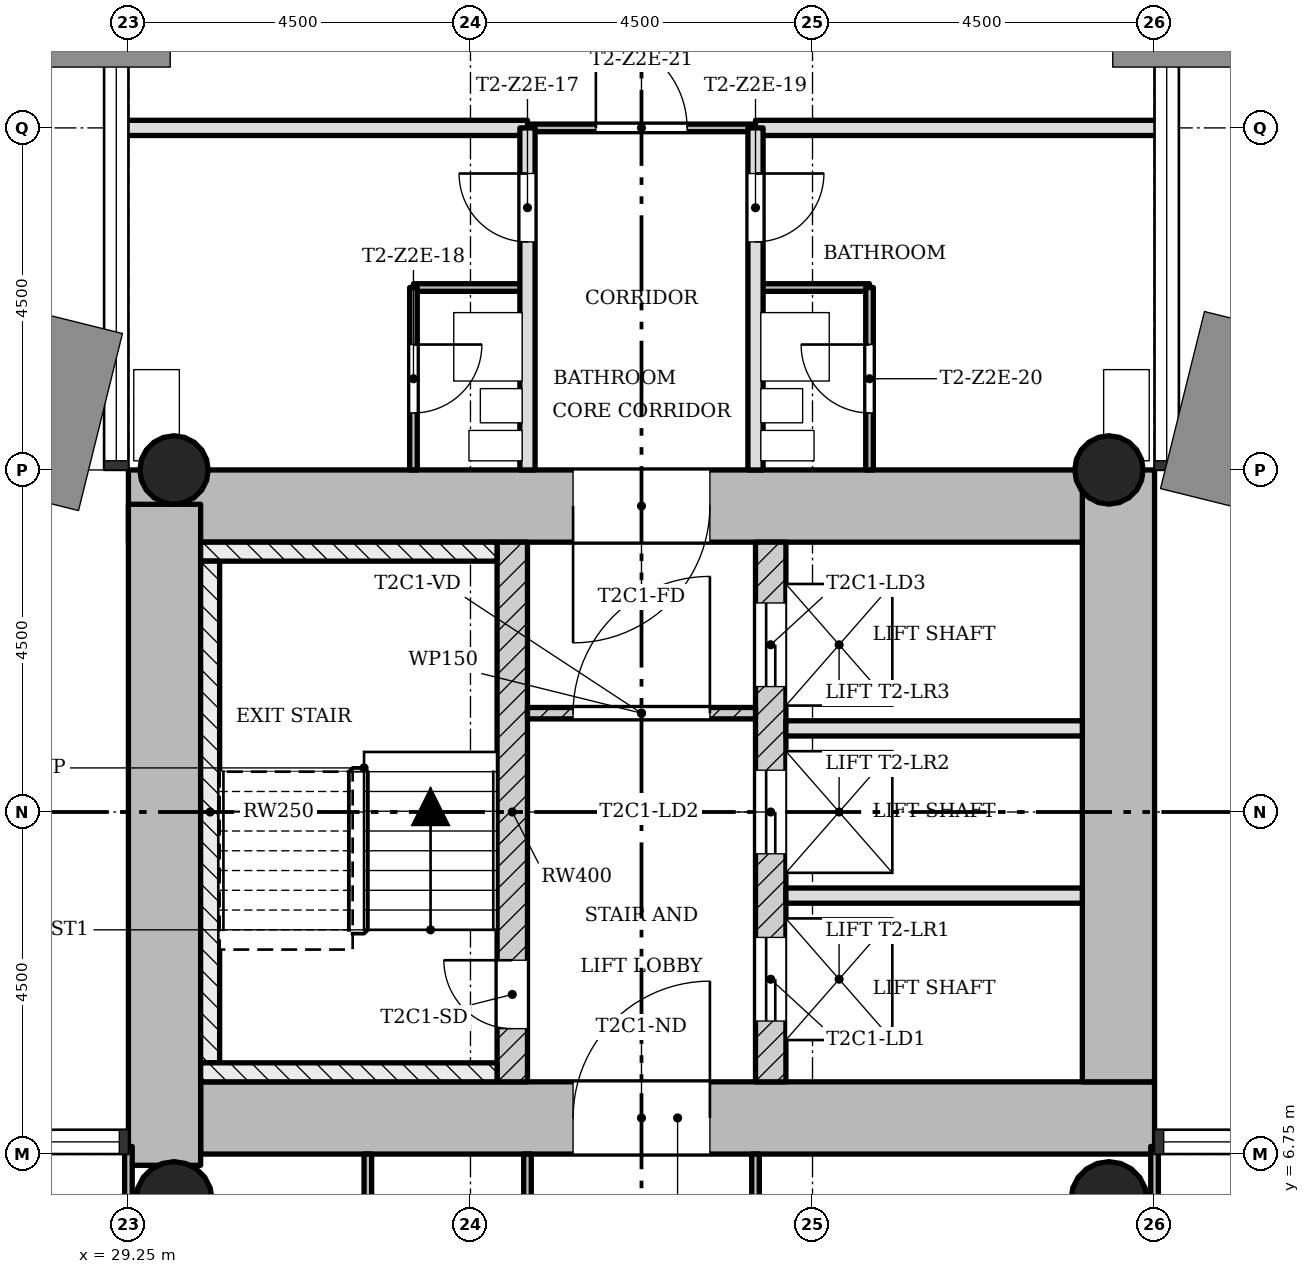
"""IFC4 building model, lengths in metres.
Left out: names, types, materials, properties, quantities, classifications, styles, units other than length and angle.
Written with IfcOpenShell. Run it as: python <this file> out.ifc"""

import sys

from ifc_helpers import new_model, si_unit, direction, frame, frame_2d, origin, origin_2d, place, context, subcontext, project, spatial, rectangle, hollow_circle, extrude, element, fill, save


model = new_model("IFC4")
c1 = context("Model", 3, precision=1e-05, world=origin(), true_north=direction((0.0, 1.0)))
c2 = subcontext(c1, "Body", "Model", "MODEL_VIEW")
j1 = project(units=[si_unit("LENGTHUNIT", "METRE"), si_unit("PLANEANGLEUNIT", "RADIAN")], contexts=[c1])
p1 = place(None, origin())
s1 = spatial("IfcSite", under=j1, at=p1, CompositionType="ELEMENT")
p2 = place(p1, origin())
s2 = spatial("IfcBuilding", under=s1, at=p2, CompositionType="ELEMENT")
p3 = place(p2, frame((0.0, 0.0, 100.4)))
s3 = spatial("IfcBuildingStorey", under=s2, at=p3, CompositionType="ELEMENT", Elevation=100.4)
p4 = place(p3, frame((30.2, 7.225, 0.0), z_axis=(0.0, 0.0, 1.0), x_axis=(1.0, 0.0, 0.0)))
e1 = element("IfcWall", 1, at=p4, inside=s3, PredefinedType="SHEAR", context=c2, shape_type="SweptSolid", body=[
    extrude(rectangle(XDim=12.55, YDim=0.95, at=frame_2d((6.275, 0.0))), origin(), (0.0, 0.0, 1.0), 3.4),
])
p5 = place(p4, frame((4.9, 0.0, 0.0)))
e2 = element("IfcOpeningElement", 2, at=p5, cuts=e1, PredefinedType="OPENING", context=c2, shape_type="SweptSolid", body=[
    extrude(rectangle(XDim=1.8, YDim=2.1, at=frame_2d((0.9, 1.05))), frame((0.0, 0.485, 0.0), z_axis=(0.0, -1.0, 0.0), x_axis=(1.0, 0.0, 0.0)), (0.0, 0.0, 1.0), 0.97),
])
p6 = place(p3, frame((42.275, 7.7, 0.0), z_axis=(0.0, 0.0, 1.0), x_axis=(0.0, 1.0, 0.0)))
e3 = element("IfcWall", 3, at=p6, inside=s3, PredefinedType="SHEAR", context=c2, shape_type="SweptSolid", body=[
    extrude(rectangle(XDim=8.05, YDim=0.95, at=frame_2d((4.025, 0.0))), origin(), (0.0, 0.0, 1.0), 3.4),
])
p7 = place(p3, frame((41.8, 15.275, 0.0), z_axis=(0.0, 0.0, 1.0), x_axis=(-1.0, 0.0, 0.0)))
e4 = element("IfcWall", 4, at=p7, inside=s3, PredefinedType="SHEAR", context=c2, shape_type="SweptSolid", body=[
    extrude(rectangle(XDim=12.55, YDim=0.95, at=frame_2d((6.275, 0.0))), origin(), (0.0, 0.0, 1.0), 3.4),
])
p8 = place(p7, frame((4.9, 0.0, 0.0)))
e5 = element("IfcOpeningElement", 5, at=p8, cuts=e4, PredefinedType="OPENING", context=c2, shape_type="SweptSolid", body=[
    extrude(rectangle(XDim=1.8, YDim=2.1, at=frame_2d((0.9, 1.05))), frame((0.0, 0.485, 0.0), z_axis=(0.0, -1.0, 0.0), x_axis=(1.0, 0.0, 0.0)), (0.0, 0.0, 1.0), 0.97),
])
p9 = place(p3, frame((29.725, 15.298, 0.0), z_axis=(0.0, 0.0, 1.0), x_axis=(0.0, -1.0, 0.0)))
e6 = element("IfcWall", 6, at=p9, inside=s3, PredefinedType="SHEAR", context=c2, shape_type="SweptSolid", body=[
    extrude(rectangle(XDim=8.696, YDim=0.95, at=frame_2d((4.348, 0.0))), origin(), (0.0, 0.0, 1.0), 3.4),
])
p10 = place(p3, frame((34.3, 7.7, 0.0), z_axis=(0.0, 0.0, 1.0), x_axis=(0.0, 1.0, 0.0)))
e7 = element("IfcWall", 7, at=p10, inside=s3, PredefinedType="SHEAR", context=c2, shape_type="SweptSolid", body=[
    extrude(rectangle(XDim=7.1, YDim=0.4, at=frame_2d((3.55, 0.0))), origin(), (0.0, 0.0, 1.0), 3.4),
])
p11 = place(p10, frame((0.7, 0.0, 0.0)))
e8 = element("IfcOpeningElement", 8, at=p11, cuts=e7, PredefinedType="OPENING", context=c2, shape_type="SweptSolid", body=[
    extrude(rectangle(XDim=0.9, YDim=2.1, at=frame_2d((0.45, 1.05))), frame((0.0, 0.21, 0.0), z_axis=(0.0, -1.0, 0.0), x_axis=(1.0, 0.0, 0.0)), (0.0, 0.0, 1.0), 0.42),
])
p12 = place(p3, frame((37.7, 7.7, 0.0), z_axis=(0.0, 0.0, 1.0), x_axis=(0.0, 1.0, 0.0)))
e9 = element("IfcWall", 9, at=p12, inside=s3, PredefinedType="SHEAR", context=c2, shape_type="SweptSolid", body=[
    extrude(rectangle(XDim=7.1, YDim=0.4, at=frame_2d((3.55, 0.0))), origin(), (0.0, 0.0, 1.0), 3.4),
])
p13 = place(p12, frame((0.8, 0.0, 0.0)))
e10 = element("IfcOpeningElement", 10, at=p13, cuts=e9, PredefinedType="OPENING", context=c2, shape_type="SweptSolid", body=[
    extrude(rectangle(XDim=1.1, YDim=2.1, at=frame_2d((0.55, 1.05))), frame((0.0, 0.21, 0.0), z_axis=(0.0, -1.0, 0.0), x_axis=(1.0, 0.0, 0.0)), (0.0, 0.0, 1.0), 0.42),
])
p14 = place(p12, frame((3.0, 0.0, 0.0)))
e11 = element("IfcOpeningElement", 11, at=p14, cuts=e9, PredefinedType="OPENING", context=c2, shape_type="SweptSolid", body=[
    extrude(rectangle(XDim=1.1, YDim=2.1, at=frame_2d((0.55, 1.05))), frame((0.0, 0.21, 0.0), z_axis=(0.0, -1.0, 0.0), x_axis=(1.0, 0.0, 0.0)), (0.0, 0.0, 1.0), 0.42),
])
p15 = place(p12, frame((5.2, 0.0, 0.0)))
e12 = element("IfcOpeningElement", 12, at=p15, cuts=e9, PredefinedType="OPENING", context=c2, shape_type="SweptSolid", body=[
    extrude(rectangle(XDim=1.1, YDim=2.1, at=frame_2d((0.55, 1.05))), frame((0.0, 0.21, 0.0), z_axis=(0.0, -1.0, 0.0), x_axis=(1.0, 0.0, 0.0)), (0.0, 0.0, 1.0), 0.42),
])
for number, where, z_axis, x_axis in (
    (13, (42.15, 15.75, 0.0), (0.0, 0.0, 1.0), (1.0, 0.0, 0.0)),
    (14, (29.85, 15.75, 0.0), (0.0, 0.0, 1.0), (1.0, 0.0, 0.0)),
):
    element("IfcColumn", number, at=place(p3, frame(where, z_axis=z_axis, x_axis=x_axis)), inside=s3, PredefinedType="COLUMN", context=c2, shape_type="SweptSolid", body=[
        extrude(hollow_circle(Radius=0.45, WallThickness=0.032, at=origin_2d()), origin(), (0.0, 0.0, 1.0), 3.4),
    ])
for number, where, z_axis, x_axis in (
    (15, (42.15, 6.15, 0.0), (0.0, 0.0, 1.0), (1.0, 0.0, 0.0)),
    (16, (29.85, 6.15, 0.0), (0.0, 0.0, 1.0), (1.0, 0.0, 0.0)),
):
    element("IfcColumn", number, at=place(p3, frame(where, z_axis=z_axis, x_axis=x_axis)), inside=s3, PredefinedType="COLUMN", context=c2, shape_type="SweptSolid", body=[
        extrude(hollow_circle(Radius=0.5, WallThickness=0.036, at=origin_2d()), origin(), (0.0, 0.0, 1.0), 3.4),
    ])
p16 = place(p3, frame((37.5, 12.55, 0.0), z_axis=(0.0, 0.0, 1.0), x_axis=(-1.0, 0.0, 0.0)))
e17 = element("IfcWall", 17, at=p16, inside=s3, PredefinedType="PARTITIONING", context=c2, shape_type="SweptSolid", body=[
    extrude(rectangle(XDim=3.0, YDim=0.15, at=frame_2d((1.5, 0.0))), origin(), (0.0, 0.0, 1.0), 3.0),
])
p17 = place(p16, frame((0.6, 0.0, 0.0)))
e18 = element("IfcOpeningElement", 18, at=p17, cuts=e17, PredefinedType="OPENING", context=c2, shape_type="SweptSolid", body=[
    extrude(rectangle(XDim=1.8, YDim=2.1, at=frame_2d((0.9, 1.05))), frame((0.0, 0.085, 0.0), z_axis=(0.0, -1.0, 0.0), x_axis=(1.0, 0.0, 0.0)), (0.0, 0.0, 1.0), 0.17),
])
for number, where, z_axis, x_axis in (
    (19, (41.8, 10.15, 0.0), (0.0, 0.0, 1.0), (-1.0, 0.0, 0.0)),
    (20, (41.8, 12.35, 0.0), (0.0, 0.0, 1.0), (-1.0, 0.0, 0.0)),
):
    element("IfcWall", number, at=place(p3, frame(where, z_axis=z_axis, x_axis=x_axis)), inside=s3, PredefinedType="SOLIDWALL", context=c2, shape_type="SweptSolid", body=[
        extrude(rectangle(XDim=3.9, YDim=0.2, at=frame_2d((1.95, 0.0))), origin(), (0.0, 0.0, 1.0), 3.0),
    ])
for number, where, z_axis, x_axis in (
    (21, (39.0, 18.15, 0.0), (0.0, 0.0, 1.0), (-1.0, 0.0, 0.0)),
    (22, (34.5, 18.15, 0.0), (0.0, 0.0, 1.0), (-1.0, 0.0, 0.0)),
):
    element("IfcWall", number, at=place(p3, frame(where, z_axis=z_axis, x_axis=x_axis)), inside=s3, PredefinedType="PARTITIONING", context=c2, shape_type="SweptSolid", body=[
        extrude(rectangle(XDim=1.5, YDim=0.1, at=frame_2d((0.75, 0.0))), origin(), (0.0, 0.0, 1.0), 3.0),
    ])
p18 = place(p3, frame((37.5, 20.25, 0.0), z_axis=(0.0, 0.0, 1.0), x_axis=(-1.0, 0.0, 0.0)))
e23 = element("IfcWall", 23, at=p18, inside=s3, PredefinedType="PARTITIONING", context=c2, shape_type="SweptSolid", body=[
    extrude(rectangle(XDim=3.0, YDim=0.1, at=frame_2d((1.5, 0.0))), origin(), (0.0, 0.0, 1.0), 3.0),
])
p19 = place(p18, frame((0.9, 0.0, 0.0)))
e24 = element("IfcOpeningElement", 24, at=p19, cuts=e23, PredefinedType="OPENING", context=c2, shape_type="SweptSolid", body=[
    extrude(rectangle(XDim=1.2, YDim=2.1, at=frame_2d((0.6, 1.05))), frame((0.0, 0.06, 0.0), z_axis=(0.0, -1.0, 0.0), x_axis=(1.0, 0.0, 0.0)), (0.0, 0.0, 1.0), 0.12),
])
for number, where, z_axis, x_axis in (
    (25, (42.85, 20.25, 0.0), (0.0, 0.0, 1.0), (-1.0, 0.0, 0.0)),
    (26, (34.5, 20.25, 0.0), (0.0, 0.0, 1.0), (-1.0, 0.0, 0.0)),
):
    element("IfcWall", number, at=place(p3, frame(where, z_axis=z_axis, x_axis=x_axis)), inside=s3, PredefinedType="SOLIDWALL", context=c2, shape_type="SweptSolid", body=[
        extrude(rectangle(XDim=5.35, YDim=0.2, at=frame_2d((2.675, 0.0))), origin(), (0.0, 0.0, 1.0), 3.0),
    ])
p20 = place(p3, frame((42.75, 0.9, 0.0), z_axis=(0.0, 0.0, 1.0), x_axis=(0.0, 1.0, 0.0)))
e27 = element("IfcWall", 27, at=p20, inside=s3, PredefinedType="PARTITIONING", context=c2, shape_type="SweptSolid", body=[
    extrude(rectangle(XDim=5.95, YDim=0.1, at=frame_2d((2.975, 0.0))), origin(), (0.0, 0.0, 1.0), 3.0),
])
p21 = place(p3, frame((39.0, 15.75, 0.0), z_axis=(0.0, 0.0, 1.0), x_axis=(0.0, 1.0, 0.0)))
e28 = element("IfcWall", 28, at=p21, inside=s3, PredefinedType="PARTITIONING", context=c2, shape_type="SweptSolid", body=[
    extrude(rectangle(XDim=2.4, YDim=0.1, at=frame_2d((1.2, 0.0))), origin(), (0.0, 0.0, 1.0), 3.0),
])
p22 = place(p21, frame((0.75, 0.0, 0.0)))
e29 = element("IfcOpeningElement", 29, at=p22, cuts=e28, PredefinedType="OPENING", context=c2, shape_type="SweptSolid", body=[
    extrude(rectangle(XDim=0.9, YDim=2.1, at=frame_2d((0.45, 1.05))), frame((0.0, 0.06, 0.0), z_axis=(0.0, -1.0, 0.0), x_axis=(1.0, 0.0, 0.0)), (0.0, 0.0, 1.0), 0.12),
])
p23 = place(p3, frame((37.5, 0.9, 0.0), z_axis=(0.0, 0.0, 1.0), x_axis=(0.0, 1.0, 0.0)))
e30 = element("IfcWall", 30, at=p23, inside=s3, PredefinedType="PARTITIONING", context=c2, shape_type="SweptSolid", body=[
    extrude(rectangle(XDim=5.85, YDim=0.1, at=frame_2d((2.925, 0.0))), origin(), (0.0, 0.0, 1.0), 3.0),
])
p24 = place(p23, frame((4.125, 0.0, 0.0)))
e31 = element("IfcOpeningElement", 31, at=p24, cuts=e30, PredefinedType="OPENING", context=c2, shape_type="SweptSolid", body=[
    extrude(rectangle(XDim=0.9, YDim=2.1, at=frame_2d((0.45, 1.05))), frame((0.0, 0.06, 0.0), z_axis=(0.0, -1.0, 0.0), x_axis=(1.0, 0.0, 0.0)), (0.0, 0.0, 1.0), 0.12),
])
p25 = place(p3, frame((37.5, 15.75, 0.0), z_axis=(0.0, 0.0, 1.0), x_axis=(0.0, 1.0, 0.0)))
e32 = element("IfcWall", 32, at=p25, inside=s3, PredefinedType="SOLIDWALL", context=c2, shape_type="SweptSolid", body=[
    extrude(rectangle(XDim=4.5, YDim=0.2, at=frame_2d((2.25, 0.0))), origin(), (0.0, 0.0, 1.0), 3.0),
])
p26 = place(p25, frame((3.0, 0.0, 0.0)))
e33 = element("IfcOpeningElement", 33, at=p26, cuts=e32, PredefinedType="OPENING", context=c2, shape_type="SweptSolid", body=[
    extrude(rectangle(XDim=0.9, YDim=2.1, at=frame_2d((0.45, 1.05))), frame((0.0, 0.11, 0.0), z_axis=(0.0, -1.0, 0.0), x_axis=(1.0, 0.0, 0.0)), (0.0, 0.0, 1.0), 0.22),
])
p27 = place(p3, frame((34.5, 0.9, 0.0), z_axis=(0.0, 0.0, 1.0), x_axis=(0.0, 1.0, 0.0)))
e34 = element("IfcWall", 34, at=p27, inside=s3, PredefinedType="PARTITIONING", context=c2, shape_type="SweptSolid", body=[
    extrude(rectangle(XDim=5.85, YDim=0.1, at=frame_2d((2.925, 0.0))), origin(), (0.0, 0.0, 1.0), 3.0),
])
p28 = place(p27, frame((2.475, 0.0, 0.0)))
e35 = element("IfcOpeningElement", 35, at=p28, cuts=e34, PredefinedType="OPENING", context=c2, shape_type="SweptSolid", body=[
    extrude(rectangle(XDim=0.9, YDim=2.1, at=frame_2d((0.45, 1.05))), frame((0.0, 0.06, 0.0), z_axis=(0.0, -1.0, 0.0), x_axis=(1.0, 0.0, 0.0)), (0.0, 0.0, 1.0), 0.12),
])
p29 = place(p3, frame((34.5, 15.75, 0.0), z_axis=(0.0, 0.0, 1.0), x_axis=(0.0, 1.0, 0.0)))
e36 = element("IfcWall", 36, at=p29, inside=s3, PredefinedType="SOLIDWALL", context=c2, shape_type="SweptSolid", body=[
    extrude(rectangle(XDim=4.5, YDim=0.2, at=frame_2d((2.25, 0.0))), origin(), (0.0, 0.0, 1.0), 3.0),
])
p30 = place(p29, frame((3.0, 0.0, 0.0)))
e37 = element("IfcOpeningElement", 37, at=p30, cuts=e36, PredefinedType="OPENING", context=c2, shape_type="SweptSolid", body=[
    extrude(rectangle(XDim=0.9, YDim=2.1, at=frame_2d((0.45, 1.05))), frame((0.0, 0.11, 0.0), z_axis=(0.0, -1.0, 0.0), x_axis=(1.0, 0.0, 0.0)), (0.0, 0.0, 1.0), 0.22),
])
p31 = place(p3, frame((33.0, 15.75, 0.0), z_axis=(0.0, 0.0, 1.0), x_axis=(0.0, 1.0, 0.0)))
e38 = element("IfcWall", 38, at=p31, inside=s3, PredefinedType="PARTITIONING", context=c2, shape_type="SweptSolid", body=[
    extrude(rectangle(XDim=2.4, YDim=0.1, at=frame_2d((1.2, 0.0))), origin(), (0.0, 0.0, 1.0), 3.0),
])
p32 = place(p31, frame((0.75, 0.0, 0.0)))
e39 = element("IfcOpeningElement", 39, at=p32, cuts=e38, PredefinedType="OPENING", context=c2, shape_type="SweptSolid", body=[
    extrude(rectangle(XDim=0.9, YDim=2.1, at=frame_2d((0.45, 1.05))), frame((0.0, 0.06, 0.0), z_axis=(0.0, -1.0, 0.0), x_axis=(1.0, 0.0, 0.0)), (0.0, 0.0, 1.0), 0.12),
])
p33 = place(p3, frame((32.4, 0.9, 0.0), z_axis=(0.0, 0.0, 1.0), x_axis=(0.0, 1.0, 0.0)))
e40 = element("IfcWall", 40, at=p33, inside=s3, PredefinedType="PARTITIONING", context=c2, shape_type="SweptSolid", body=[
    extrude(rectangle(XDim=5.85, YDim=0.1, at=frame_2d((2.925, 0.0))), origin(), (0.0, 0.0, 1.0), 3.0),
])
p34 = place(p3, frame((29.25, 0.9, 0.0), z_axis=(0.0, 0.0, 1.0), x_axis=(0.0, 1.0, 0.0)))
e41 = element("IfcWall", 41, at=p34, inside=s3, PredefinedType="PARTITIONING", context=c2, shape_type="SweptSolid", body=[
    extrude(rectangle(XDim=5.95, YDim=0.1, at=frame_2d((2.975, 0.0))), origin(), (0.0, 0.0, 1.0), 3.0),
])
p35 = place(p3, frame((34.1, 14.675, 0.0), z_axis=(0.0, 0.0, 1.0), x_axis=(-1.0, 0.0, 0.0)))
e42 = element("IfcWall", 42, at=p35, inside=s3, PredefinedType="SHEAR", context=c2, shape_type="SweptSolid", body=[
    extrude(rectangle(XDim=3.9, YDim=0.25, at=frame_2d((1.95, 0.0))), origin(), (0.0, 0.0, 1.0), 3.4),
])
p36 = place(p3, frame((30.325, 7.95, 0.0), z_axis=(0.0, 0.0, 1.0), x_axis=(0.0, 1.0, 0.0)))
e43 = element("IfcWall", 43, at=p36, inside=s3, PredefinedType="SHEAR", context=c2, shape_type="SweptSolid", body=[
    extrude(rectangle(XDim=6.6, YDim=0.25, at=frame_2d((3.3, 0.0))), origin(), (0.0, 0.0, 1.0), 3.4),
])
p37 = place(p3, frame((34.1, 7.825, 0.0), z_axis=(0.0, 0.0, 1.0), x_axis=(-1.0, 0.0, 0.0)))
e44 = element("IfcWall", 44, at=p37, inside=s3, PredefinedType="SHEAR", context=c2, shape_type="SweptSolid", body=[
    extrude(rectangle(XDim=3.9, YDim=0.25, at=frame_2d((1.95, 0.0))), origin(), (0.0, 0.0, 1.0), 3.4),
])
p38 = place(p17, origin())
e45 = element("IfcDoor", 45, at=p38, inside=s3, OperationType="SINGLE_SWING_LEFT", PredefinedType="DOOR", context=c2, shape_type="SweptSolid", body=[
    extrude(rectangle(XDim=1.8, YDim=2.1, at=frame_2d((0.9, 1.05))), frame((0.0, 0.025, 0.0), z_axis=(0.0, -1.0, 0.0), x_axis=(1.0, 0.0, 0.0)), (0.0, 0.0, 1.0), 0.05),
])
fill(e18, e45)
p39 = place(p30, origin())
e46 = element("IfcDoor", 46, at=p39, inside=s3, OperationType="SINGLE_SWING_LEFT", PredefinedType="DOOR", context=c2, shape_type="SweptSolid", body=[
    extrude(rectangle(XDim=0.9, YDim=2.1, at=frame_2d((0.45, 1.05))), frame((0.0, 0.025, 0.0), z_axis=(0.0, -1.0, 0.0), x_axis=(1.0, 0.0, 0.0)), (0.0, 0.0, 1.0), 0.05),
])
fill(e37, e46)
p40 = place(p32, origin())
e47 = element("IfcDoor", 47, at=p40, inside=s3, OperationType="SINGLE_SWING_RIGHT", PredefinedType="DOOR", context=c2, shape_type="SweptSolid", body=[
    extrude(rectangle(XDim=0.9, YDim=2.1, at=frame_2d((0.45, 1.05))), frame((0.0, 0.025, 0.0), z_axis=(0.0, -1.0, 0.0), x_axis=(1.0, 0.0, 0.0)), (0.0, 0.0, 1.0), 0.05),
])
fill(e39, e47)
p41 = place(p26, origin())
e48 = element("IfcDoor", 48, at=p41, inside=s3, OperationType="SINGLE_SWING_RIGHT", PredefinedType="DOOR", context=c2, shape_type="SweptSolid", body=[
    extrude(rectangle(XDim=0.9, YDim=2.1, at=frame_2d((0.45, 1.05))), frame((0.0, 0.025, 0.0), z_axis=(0.0, -1.0, 0.0), x_axis=(1.0, 0.0, 0.0)), (0.0, 0.0, 1.0), 0.05),
])
fill(e33, e48)
p42 = place(p22, origin())
e49 = element("IfcDoor", 49, at=p42, inside=s3, OperationType="SINGLE_SWING_LEFT", PredefinedType="DOOR", context=c2, shape_type="SweptSolid", body=[
    extrude(rectangle(XDim=0.9, YDim=2.1, at=frame_2d((0.45, 1.05))), frame((0.0, 0.025, 0.0), z_axis=(0.0, -1.0, 0.0), x_axis=(1.0, 0.0, 0.0)), (0.0, 0.0, 1.0), 0.05),
])
fill(e29, e49)
p43 = place(p19, origin())
e50 = element("IfcDoor", 50, at=p43, inside=s3, OperationType="SINGLE_SWING_RIGHT", PredefinedType="DOOR", context=c2, shape_type="SweptSolid", body=[
    extrude(rectangle(XDim=1.2, YDim=2.1, at=frame_2d((0.6, 1.05))), frame((0.0, 0.025, 0.0), z_axis=(0.0, -1.0, 0.0), x_axis=(1.0, 0.0, 0.0)), (0.0, 0.0, 1.0), 0.05),
])
fill(e24, e50)
p44 = place(p11, origin())
e51 = element("IfcDoor", 51, at=p44, inside=s3, OperationType="SINGLE_SWING_LEFT", PredefinedType="DOOR", context=c2, shape_type="SweptSolid", body=[
    extrude(rectangle(XDim=0.9, YDim=2.1, at=frame_2d((0.45, 1.05))), frame((0.0, 0.025, 0.0), z_axis=(0.0, -1.0, 0.0), x_axis=(1.0, 0.0, 0.0)), (0.0, 0.0, 1.0), 0.05),
])
fill(e8, e51)
p45 = place(p13, origin())
e52 = element("IfcDoor", 52, at=p45, inside=s3, OperationType="SLIDING_TO_LEFT", PredefinedType="DOOR", context=c2, shape_type="SweptSolid", body=[
    extrude(rectangle(XDim=1.1, YDim=2.1, at=frame_2d((0.55, 1.05))), frame((0.0, 0.025, 0.0), z_axis=(0.0, -1.0, 0.0), x_axis=(1.0, 0.0, 0.0)), (0.0, 0.0, 1.0), 0.05),
])
fill(e10, e52)
p46 = place(p14, origin())
e53 = element("IfcDoor", 53, at=p46, inside=s3, OperationType="SLIDING_TO_LEFT", PredefinedType="DOOR", context=c2, shape_type="SweptSolid", body=[
    extrude(rectangle(XDim=1.1, YDim=2.1, at=frame_2d((0.55, 1.05))), frame((0.0, 0.025, 0.0), z_axis=(0.0, -1.0, 0.0), x_axis=(1.0, 0.0, 0.0)), (0.0, 0.0, 1.0), 0.05),
])
fill(e11, e53)
p47 = place(p15, origin())
e54 = element("IfcDoor", 54, at=p47, inside=s3, OperationType="SLIDING_TO_LEFT", PredefinedType="DOOR", context=c2, shape_type="SweptSolid", body=[
    extrude(rectangle(XDim=1.1, YDim=2.1, at=frame_2d((0.55, 1.05))), frame((0.0, 0.025, 0.0), z_axis=(0.0, -1.0, 0.0), x_axis=(1.0, 0.0, 0.0)), (0.0, 0.0, 1.0), 0.05),
])
fill(e12, e54)
p48 = place(p5, origin())
e55 = element("IfcDoor", 55, at=p48, inside=s3, OperationType="SINGLE_SWING_LEFT", PredefinedType="DOOR", context=c2, shape_type="SweptSolid", body=[
    extrude(rectangle(XDim=1.8, YDim=2.1, at=frame_2d((0.9, 1.05))), frame((0.0, 0.025, 0.0), z_axis=(0.0, -1.0, 0.0), x_axis=(1.0, 0.0, 0.0)), (0.0, 0.0, 1.0), 0.05),
])
fill(e2, e55)
p49 = place(p8, origin())
e56 = element("IfcDoor", 56, at=p49, inside=s3, OperationType="SINGLE_SWING_LEFT", PredefinedType="DOOR", context=c2, shape_type="SweptSolid", body=[
    extrude(rectangle(XDim=1.8, YDim=2.1, at=frame_2d((0.9, 1.05))), frame((0.0, 0.025, 0.0), z_axis=(0.0, -1.0, 0.0), x_axis=(1.0, 0.0, 0.0)), (0.0, 0.0, 1.0), 0.05),
])
fill(e5, e56)
save(model, sys.argv[1])
